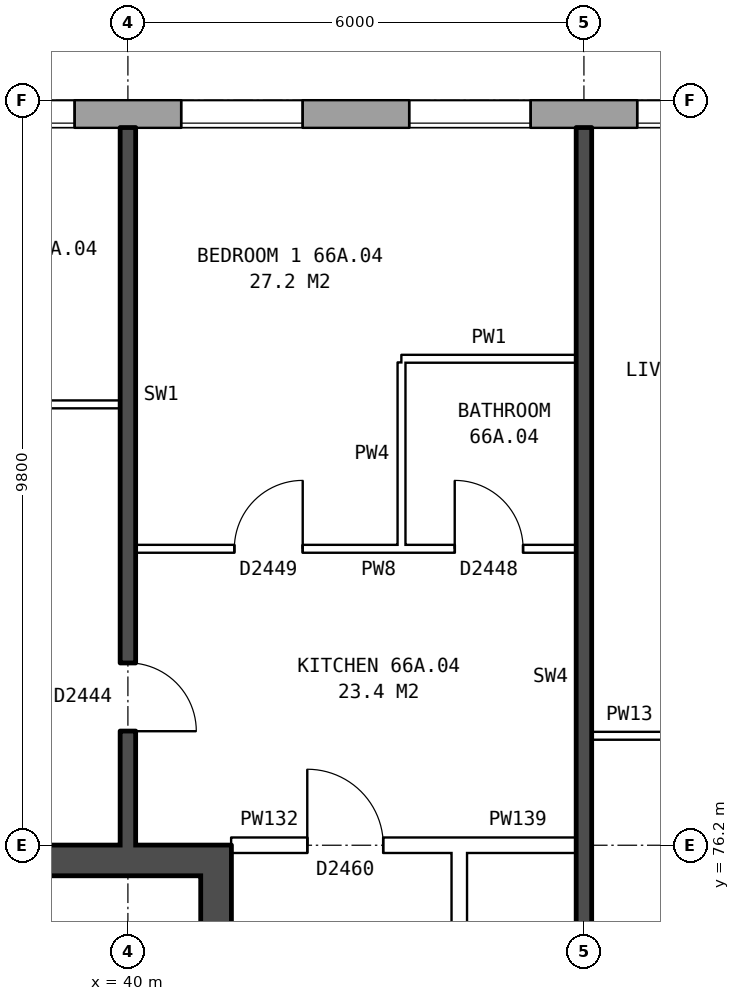
"""IFC4 building model, lengths in metres.
Left out: names, types, materials, properties, quantities, classifications, styles, units other than length and angle.
Written with IfcOpenShell. Run it as: python <this file> out.ifc"""

import sys

from ifc_helpers import new_model, si_unit, direction, frame, frame_2d, origin, place, context, subcontext, project, spatial, rectangle, extrude, element, fill, save


model = new_model("IFC4")
c1 = context("Model", 3, precision=1e-05, world=origin(), true_north=direction((0.0, 1.0)))
c2 = subcontext(c1, "Body", "Model", "MODEL_VIEW")
j1 = project(units=[si_unit("LENGTHUNIT", "METRE"), si_unit("PLANEANGLEUNIT", "RADIAN")], contexts=[c1])
p1 = place(None, origin())
s1 = spatial("IfcSite", under=j1, at=p1, CompositionType="ELEMENT")
p2 = place(p1, origin())
s2 = spatial("IfcBuilding", under=s1, at=p2, CompositionType="ELEMENT")
p3 = place(p2, frame((0.0, 0.0, 233.8)))
s3 = spatial("IfcBuildingStorey", under=s2, at=p3, CompositionType="ELEMENT", Elevation=233.8)
p4 = place(p3, frame((74.95, 85.82, 0.0), z_axis=(0.0, 0.0, 1.0), x_axis=(-1.0, 0.0, 0.0)))
e1 = element("IfcWall", 1, at=p4, inside=s3, PredefinedType="STANDARD", context=c2, shape_type="SweptSolid", body=[
    extrude(rectangle(XDim=39.875, YDim=0.36, at=frame_2d((19.938, 0.0))), origin(), (0.0, 0.0, 1.0), 2.85),
])
p5 = place(p4, frame((2.65, 0.0, 0.8)))
e2 = element("IfcOpeningElement", 2, at=p5, cuts=e1, PredefinedType="OPENING", context=c2, shape_type="SweptSolid", body=[
    extrude(rectangle(XDim=1.6, YDim=1.8, at=frame_2d((0.8, 0.9))), frame((0.0, 0.19, 0.0), z_axis=(0.0, -1.0, 0.0), x_axis=(1.0, 0.0, 0.0)), (0.0, 0.0, 1.0), 0.38),
])
p6 = place(p4, frame((5.65, 0.0, 0.8)))
e3 = element("IfcOpeningElement", 3, at=p6, cuts=e1, PredefinedType="OPENING", context=c2, shape_type="SweptSolid", body=[
    extrude(rectangle(XDim=1.6, YDim=1.8, at=frame_2d((0.8, 0.9))), frame((0.0, 0.19, 0.0), z_axis=(0.0, -1.0, 0.0), x_axis=(1.0, 0.0, 0.0)), (0.0, 0.0, 1.0), 0.38),
])
p7 = place(p4, frame((8.65, 0.0, 0.8)))
e4 = element("IfcOpeningElement", 4, at=p7, cuts=e1, PredefinedType="OPENING", context=c2, shape_type="SweptSolid", body=[
    extrude(rectangle(XDim=1.6, YDim=1.8, at=frame_2d((0.8, 0.9))), frame((0.0, 0.19, 0.0), z_axis=(0.0, -1.0, 0.0), x_axis=(1.0, 0.0, 0.0)), (0.0, 0.0, 1.0), 0.38),
])
p8 = place(p4, frame((11.65, 0.0, 0.8)))
e5 = element("IfcOpeningElement", 5, at=p8, cuts=e1, PredefinedType="OPENING", context=c2, shape_type="SweptSolid", body=[
    extrude(rectangle(XDim=1.6, YDim=1.8, at=frame_2d((0.8, 0.9))), frame((0.0, 0.19, 0.0), z_axis=(0.0, -1.0, 0.0), x_axis=(1.0, 0.0, 0.0)), (0.0, 0.0, 1.0), 0.38),
])
p9 = place(p4, frame((14.65, 0.0, 0.8)))
e6 = element("IfcOpeningElement", 6, at=p9, cuts=e1, PredefinedType="OPENING", context=c2, shape_type="SweptSolid", body=[
    extrude(rectangle(XDim=1.6, YDim=1.8, at=frame_2d((0.8, 0.9))), frame((0.0, 0.19, 0.0), z_axis=(0.0, -1.0, 0.0), x_axis=(1.0, 0.0, 0.0)), (0.0, 0.0, 1.0), 0.38),
])
p10 = place(p4, frame((17.65, 0.0, 0.8)))
e7 = element("IfcOpeningElement", 7, at=p10, cuts=e1, PredefinedType="OPENING", context=c2, shape_type="SweptSolid", body=[
    extrude(rectangle(XDim=1.6, YDim=1.8, at=frame_2d((0.8, 0.9))), frame((0.0, 0.19, 0.0), z_axis=(0.0, -1.0, 0.0), x_axis=(1.0, 0.0, 0.0)), (0.0, 0.0, 1.0), 0.38),
])
p11 = place(p4, frame((20.5, 0.0, 0.15)))
e8 = element("IfcOpeningElement", 8, at=p11, cuts=e1, PredefinedType="OPENING", context=c2, shape_type="SweptSolid", body=[
    extrude(rectangle(XDim=0.8, YDim=0.9, at=frame_2d((0.4, 0.45))), frame((0.0, 0.19, 0.0), z_axis=(0.0, -1.0, 0.0), x_axis=(1.0, 0.0, 0.0)), (0.0, 0.0, 1.0), 0.38),
])
p12 = place(p4, frame((23.65, 0.0, 0.8)))
e9 = element("IfcOpeningElement", 9, at=p12, cuts=e1, PredefinedType="OPENING", context=c2, shape_type="SweptSolid", body=[
    extrude(rectangle(XDim=1.6, YDim=1.8, at=frame_2d((0.8, 0.9))), frame((0.0, 0.19, 0.0), z_axis=(0.0, -1.0, 0.0), x_axis=(1.0, 0.0, 0.0)), (0.0, 0.0, 1.0), 0.38),
])
p13 = place(p4, frame((26.65, 0.0, 0.8)))
e10 = element("IfcOpeningElement", 10, at=p13, cuts=e1, PredefinedType="OPENING", context=c2, shape_type="SweptSolid", body=[
    extrude(rectangle(XDim=1.6, YDim=1.8, at=frame_2d((0.8, 0.9))), frame((0.0, 0.19, 0.0), z_axis=(0.0, -1.0, 0.0), x_axis=(1.0, 0.0, 0.0)), (0.0, 0.0, 1.0), 0.38),
])
p14 = place(p4, frame((29.65, 0.0, 0.8)))
e11 = element("IfcOpeningElement", 11, at=p14, cuts=e1, PredefinedType="OPENING", context=c2, shape_type="SweptSolid", body=[
    extrude(rectangle(XDim=1.6, YDim=1.8, at=frame_2d((0.8, 0.9))), frame((0.0, 0.19, 0.0), z_axis=(0.0, -1.0, 0.0), x_axis=(1.0, 0.0, 0.0)), (0.0, 0.0, 1.0), 0.38),
])
p15 = place(p4, frame((32.65, 0.0, 0.8)))
e12 = element("IfcOpeningElement", 12, at=p15, cuts=e1, PredefinedType="OPENING", context=c2, shape_type="SweptSolid", body=[
    extrude(rectangle(XDim=1.6, YDim=1.8, at=frame_2d((0.8, 0.9))), frame((0.0, 0.19, 0.0), z_axis=(0.0, -1.0, 0.0), x_axis=(1.0, 0.0, 0.0)), (0.0, 0.0, 1.0), 0.38),
])
p16 = place(p4, frame((35.65, 0.0, 0.8)))
e13 = element("IfcOpeningElement", 13, at=p16, cuts=e1, PredefinedType="OPENING", context=c2, shape_type="SweptSolid", body=[
    extrude(rectangle(XDim=1.6, YDim=1.8, at=frame_2d((0.8, 0.9))), frame((0.0, 0.19, 0.0), z_axis=(0.0, -1.0, 0.0), x_axis=(1.0, 0.0, 0.0)), (0.0, 0.0, 1.0), 0.38),
])
p17 = place(p3, frame((41.16, 76.2, 0.0), z_axis=(0.0, 0.0, 1.0), x_axis=(0.0, -1.0, 0.0)))
e14 = element("IfcWall", 14, at=p17, inside=s3, PredefinedType="SHEAR", context=c2, shape_type="SweptSolid", body=[
    extrude(rectangle(XDim=12.4, YDim=0.4, at=frame_2d((6.2, 0.0))), origin(), (0.0, 0.0, 1.0), 2.85),
])
p18 = place(p17, frame((1.325, 0.0, 0.0)))
e15 = element("IfcOpeningElement", 15, at=p18, cuts=e14, PredefinedType="OPENING", context=c2, shape_type="SweptSolid", body=[
    extrude(rectangle(XDim=1.1, YDim=2.1, at=frame_2d((0.55, 1.05))), frame((0.0, 0.21, 0.0), z_axis=(0.0, -1.0, 0.0), x_axis=(1.0, 0.0, 0.0)), (0.0, 0.0, 1.0), 0.42),
])
p19 = place(p17, frame((4.225, 0.0, 0.0)))
e16 = element("IfcOpeningElement", 16, at=p19, cuts=e14, PredefinedType="OPENING", context=c2, shape_type="SweptSolid", body=[
    extrude(rectangle(XDim=0.85, YDim=2.1, at=frame_2d((0.425, 1.05))), frame((0.0, 0.21, 0.0), z_axis=(0.0, -1.0, 0.0), x_axis=(1.0, 0.0, 0.0)), (0.0, 0.0, 1.0), 0.42),
])
p20 = place(p17, frame((7.475, 0.0, 0.0)))
e17 = element("IfcOpeningElement", 17, at=p20, cuts=e14, PredefinedType="OPENING", context=c2, shape_type="SweptSolid", body=[
    extrude(rectangle(XDim=0.85, YDim=2.1, at=frame_2d((0.425, 1.05))), frame((0.0, 0.21, 0.0), z_axis=(0.0, -1.0, 0.0), x_axis=(1.0, 0.0, 0.0)), (0.0, 0.0, 1.0), 0.42),
])
p21 = place(p17, frame((9.9, 0.0, 0.0)))
e18 = element("IfcOpeningElement", 18, at=p21, cuts=e14, PredefinedType="OPENING", context=c2, shape_type="SweptSolid", body=[
    extrude(rectangle(XDim=1.1, YDim=2.1, at=frame_2d((0.55, 1.05))), frame((0.0, 0.21, 0.0), z_axis=(0.0, -1.0, 0.0), x_axis=(1.0, 0.0, 0.0)), (0.0, 0.0, 1.0), 0.42),
])
p22 = place(p3, frame((40.96, 76.0, 0.0), z_axis=(0.0, 0.0, 1.0), x_axis=(-1.0, 0.0, 0.0)))
e19 = element("IfcWall", 19, at=p22, inside=s3, PredefinedType="SHEAR", context=c2, shape_type="SweptSolid", body=[
    extrude(rectangle(XDim=8.2, YDim=0.4, at=frame_2d((4.1, 0.0))), origin(), (0.0, 0.0, 1.0), 2.85),
])
p23 = place(p3, frame((44.36, 63.9, 0.0), z_axis=(0.0, 0.0, 1.0), x_axis=(0.0, 1.0, 0.0)))
e20 = element("IfcWall", 20, at=p23, inside=s3, PredefinedType="PARTITIONING", context=c2, shape_type="SweptSolid", body=[
    extrude(rectangle(XDim=12.2, YDim=0.2, at=frame_2d((6.1, 0.0))), origin(), (0.0, 0.0, 1.0), 2.85),
])
p24 = place(p23, frame((5.1, 0.0, 0.0)))
e21 = element("IfcOpeningElement", 21, at=p24, cuts=e20, PredefinedType="OPENING", context=c2, shape_type="SweptSolid", body=[
    extrude(rectangle(XDim=2.0, YDim=2.1, at=frame_2d((1.0, 1.05))), frame((0.0, 0.11, 0.0), z_axis=(0.0, -1.0, 0.0), x_axis=(1.0, 0.0, 0.0)), (0.0, 0.0, 1.0), 0.22),
])
p25 = place(p3, frame((41.36, 76.2, 0.0), z_axis=(0.0, 0.0, 1.0), x_axis=(1.0, 0.0, 0.0)))
e22 = element("IfcWall", 22, at=p25, inside=s3, PredefinedType="PARTITIONING", context=c2, shape_type="SweptSolid", body=[
    extrude(rectangle(XDim=3.0, YDim=0.2, at=frame_2d((1.5, 0.0))), origin(), (0.0, 0.0, 1.0), 2.85),
])
p26 = place(p25, frame((1.0, 0.0, 0.0)))
e23 = element("IfcOpeningElement", 23, at=p26, cuts=e22, PredefinedType="OPENING", context=c2, shape_type="SweptSolid", body=[
    extrude(rectangle(XDim=1.0, YDim=2.1, at=frame_2d((0.5, 1.05))), frame((0.0, 0.11, 0.0), z_axis=(0.0, -1.0, 0.0), x_axis=(1.0, 0.0, 0.0)), (0.0, 0.0, 1.0), 0.22),
])
p27 = place(p3, frame((44.36, 76.2, 0.0), z_axis=(0.0, 0.0, 1.0), x_axis=(1.0, 0.0, 0.0)))
e24 = element("IfcWall", 24, at=p27, inside=s3, PredefinedType="PARTITIONING", context=c2, shape_type="SweptSolid", body=[
    extrude(rectangle(XDim=1.54, YDim=0.2, at=frame_2d((0.77, 0.0))), origin(), (0.0, 0.0, 1.0), 2.85),
])
p28 = place(p3, frame((46.1, 77.64, 0.0), z_axis=(0.0, 0.0, 1.0), x_axis=(1.0, 0.0, 0.0)))
e25 = element("IfcWall", 25, at=p28, inside=s3, PredefinedType="PARTITIONING", context=c2, shape_type="SweptSolid", body=[
    extrude(rectangle(XDim=2.9, YDim=0.1, at=frame_2d((1.45, 0.0))), origin(), (0.0, 0.0, 1.0), 2.85),
])
p29 = place(p28, frame((1.0, 0.0, 0.0)))
e26 = element("IfcOpeningElement", 26, at=p29, cuts=e25, PredefinedType="OPENING", context=c2, shape_type="SweptSolid", body=[
    extrude(rectangle(XDim=0.9, YDim=2.1, at=frame_2d((0.45, 1.05))), frame((0.0, 0.06, 0.0), z_axis=(0.0, -1.0, 0.0), x_axis=(1.0, 0.0, 0.0)), (0.0, 0.0, 1.0), 0.12),
])
p30 = place(p3, frame((40.1, 80.1, 0.0), z_axis=(0.0, 0.0, 1.0), x_axis=(1.0, 0.0, 0.0)))
e27 = element("IfcWall", 27, at=p30, inside=s3, PredefinedType="PARTITIONING", context=c2, shape_type="SweptSolid", body=[
    extrude(rectangle(XDim=5.8, YDim=0.1, at=frame_2d((2.9, 0.0))), origin(), (0.0, 0.0, 1.0), 2.85),
])
p31 = place(p30, frame((1.3, 0.0, 0.0)))
e28 = element("IfcOpeningElement", 28, at=p31, cuts=e27, PredefinedType="OPENING", context=c2, shape_type="SweptSolid", body=[
    extrude(rectangle(XDim=0.9, YDim=2.1, at=frame_2d((0.45, 1.05))), frame((0.0, 0.06, 0.0), z_axis=(0.0, -1.0, 0.0), x_axis=(1.0, 0.0, 0.0)), (0.0, 0.0, 1.0), 0.12),
])
p32 = place(p30, frame((4.2, 0.0, 0.0)))
e29 = element("IfcOpeningElement", 29, at=p32, cuts=e27, PredefinedType="OPENING", context=c2, shape_type="SweptSolid", body=[
    extrude(rectangle(XDim=0.9, YDim=2.1, at=frame_2d((0.45, 1.05))), frame((0.0, 0.06, 0.0), z_axis=(0.0, -1.0, 0.0), x_axis=(1.0, 0.0, 0.0)), (0.0, 0.0, 1.0), 0.12),
])
p33 = place(p3, frame((32.36, 82.0, 0.0), z_axis=(0.0, 0.0, 1.0), x_axis=(1.0, 0.0, 0.0)))
e30 = element("IfcWall", 30, at=p33, inside=s3, PredefinedType="PARTITIONING", context=c2, shape_type="SweptSolid", body=[
    extrude(rectangle(XDim=7.54, YDim=0.1, at=frame_2d((3.77, 0.0))), origin(), (0.0, 0.0, 1.0), 2.85),
])
p34 = place(p33, frame((3.32, 0.0, 0.0)))
e31 = element("IfcOpeningElement", 31, at=p34, cuts=e30, PredefinedType="OPENING", context=c2, shape_type="SweptSolid", body=[
    extrude(rectangle(XDim=0.9, YDim=2.1, at=frame_2d((0.45, 1.05))), frame((0.0, 0.06, 0.0), z_axis=(0.0, -1.0, 0.0), x_axis=(1.0, 0.0, 0.0)), (0.0, 0.0, 1.0), 0.12),
])
p35 = place(p3, frame((43.6, 82.6, 0.0), z_axis=(0.0, 0.0, 1.0), x_axis=(1.0, 0.0, 0.0)))
e32 = element("IfcWall", 32, at=p35, inside=s3, PredefinedType="PARTITIONING", context=c2, shape_type="SweptSolid", body=[
    extrude(rectangle(XDim=2.3, YDim=0.1, at=frame_2d((1.15, 0.0))), origin(), (0.0, 0.0, 1.0), 2.85),
])
p36 = place(p3, frame((40.0, 76.2, 0.0), z_axis=(0.0, 0.0, 1.0), x_axis=(0.0, 1.0, 0.0)))
e33 = element("IfcWall", 33, at=p36, inside=s3, PredefinedType="SOLIDWALL", context=c2, shape_type="SweptSolid", body=[
    extrude(rectangle(XDim=9.44, YDim=0.2, at=frame_2d((4.72, 0.0))), origin(), (0.0, 0.0, 1.0), 2.85),
])
p37 = place(p36, frame((1.5, 0.0, 0.0)))
e34 = element("IfcOpeningElement", 34, at=p37, cuts=e33, PredefinedType="OPENING", context=c2, shape_type="SweptSolid", body=[
    extrude(rectangle(XDim=0.9, YDim=2.1, at=frame_2d((0.45, 1.05))), frame((0.0, 0.11, 0.0), z_axis=(0.0, -1.0, 0.0), x_axis=(1.0, 0.0, 0.0)), (0.0, 0.0, 1.0), 0.22),
])
p38 = place(p3, frame((43.6, 80.15, 0.0), z_axis=(0.0, 0.0, 1.0), x_axis=(0.0, 1.0, 0.0)))
e35 = element("IfcWall", 35, at=p38, inside=s3, PredefinedType="PARTITIONING", context=c2, shape_type="SweptSolid", body=[
    extrude(rectangle(XDim=2.4, YDim=0.1, at=frame_2d((1.2, 0.0))), origin(), (0.0, 0.0, 1.0), 2.85),
])
p39 = place(p3, frame((46.0, 71.2, 0.0), z_axis=(0.0, 0.0, 1.0), x_axis=(0.0, 1.0, 0.0)))
e36 = element("IfcWall", 36, at=p39, inside=s3, PredefinedType="SOLIDWALL", context=c2, shape_type="SweptSolid", body=[
    extrude(rectangle(XDim=14.44, YDim=0.2, at=frame_2d((7.22, 0.0))), origin(), (0.0, 0.0, 1.0), 2.85),
])
p40 = place(p13, origin())
e37 = element("IfcWindow", 37, at=p40, inside=s3, PartitioningType="SINGLE_PANEL", PredefinedType="WINDOW", context=c2, shape_type="SweptSolid", body=[
    extrude(rectangle(XDim=1.6, YDim=1.8, at=frame_2d((0.8, 0.9))), frame((0.0, 0.15, 0.0), z_axis=(0.0, -1.0, 0.0), x_axis=(1.0, 0.0, 0.0)), (0.0, 0.0, 1.0), 0.06),
])
fill(e10, e37)
p41 = place(p14, origin())
e38 = element("IfcWindow", 38, at=p41, inside=s3, PartitioningType="SINGLE_PANEL", PredefinedType="WINDOW", context=c2, shape_type="SweptSolid", body=[
    extrude(rectangle(XDim=1.6, YDim=1.8, at=frame_2d((0.8, 0.9))), frame((0.0, 0.15, 0.0), z_axis=(0.0, -1.0, 0.0), x_axis=(1.0, 0.0, 0.0)), (0.0, 0.0, 1.0), 0.06),
])
fill(e11, e38)
p42 = place(p15, origin())
e39 = element("IfcWindow", 39, at=p42, inside=s3, PartitioningType="SINGLE_PANEL", PredefinedType="WINDOW", context=c2, shape_type="SweptSolid", body=[
    extrude(rectangle(XDim=1.6, YDim=1.8, at=frame_2d((0.8, 0.9))), frame((0.0, 0.15, 0.0), z_axis=(0.0, -1.0, 0.0), x_axis=(1.0, 0.0, 0.0)), (0.0, 0.0, 1.0), 0.06),
])
fill(e12, e39)
p43 = place(p16, origin())
e40 = element("IfcWindow", 40, at=p43, inside=s3, PartitioningType="SINGLE_PANEL", PredefinedType="WINDOW", context=c2, shape_type="SweptSolid", body=[
    extrude(rectangle(XDim=1.6, YDim=1.8, at=frame_2d((0.8, 0.9))), frame((0.0, 0.15, 0.0), z_axis=(0.0, -1.0, 0.0), x_axis=(1.0, 0.0, 0.0)), (0.0, 0.0, 1.0), 0.06),
])
fill(e13, e40)
p44 = place(p31, origin())
e41 = element("IfcDoor", 41, at=p44, inside=s3, OperationType="SINGLE_SWING_RIGHT", PredefinedType="DOOR", context=c2, shape_type="SweptSolid", body=[
    extrude(rectangle(XDim=0.9, YDim=2.1, at=frame_2d((0.45, 1.05))), frame((0.0, 0.025, 0.0), z_axis=(0.0, -1.0, 0.0), x_axis=(1.0, 0.0, 0.0)), (0.0, 0.0, 1.0), 0.05),
])
fill(e28, e41)
p45 = place(p26, origin())
e42 = element("IfcDoor", 42, at=p45, inside=s3, OperationType="SINGLE_SWING_LEFT", PredefinedType="DOOR", context=c2, shape_type="SweptSolid", body=[
    extrude(rectangle(XDim=1.0, YDim=2.1, at=frame_2d((0.5, 1.05))), frame((0.0, 0.025, 0.0), z_axis=(0.0, -1.0, 0.0), x_axis=(1.0, 0.0, 0.0)), (0.0, 0.0, 1.0), 0.05),
])
fill(e23, e42)
p46 = place(p37, frame((0.9, 0.0, 0.0), z_axis=(0.0, 0.0, 1.0), x_axis=(-1.0, 0.0, 0.0)))
e43 = element("IfcDoor", 43, at=p46, inside=s3, OperationType="SINGLE_SWING_RIGHT", PredefinedType="DOOR", context=c2, shape_type="SweptSolid", body=[
    extrude(rectangle(XDim=0.9, YDim=2.1, at=frame_2d((0.45, 1.05))), frame((0.0, 0.025, 0.0), z_axis=(0.0, -1.0, 0.0), x_axis=(1.0, 0.0, 0.0)), (0.0, 0.0, 1.0), 0.05),
])
fill(e34, e43)
p47 = place(p32, origin())
e44 = element("IfcDoor", 44, at=p47, inside=s3, OperationType="SINGLE_SWING_LEFT", PredefinedType="DOOR", context=c2, shape_type="SweptSolid", body=[
    extrude(rectangle(XDim=0.9, YDim=2.1, at=frame_2d((0.45, 1.05))), frame((0.0, 0.025, 0.0), z_axis=(0.0, -1.0, 0.0), x_axis=(1.0, 0.0, 0.0)), (0.0, 0.0, 1.0), 0.05),
])
fill(e29, e44)
save(model, sys.argv[1])
